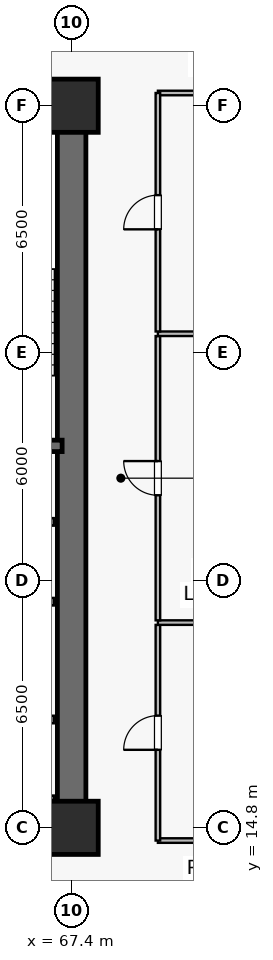
"""IFC4 building model, lengths in metres.
Left out: names, types, materials, properties, quantities, classifications, styles, units other than length and angle.
Written with IfcOpenShell. Run it as: python <this file> out.ifc"""

import sys

from ifc_helpers import new_model, si_unit, direction, frame, frame_2d, origin, origin_2d, place, context, subcontext, project, spatial, rectangle, extrude, source, transform, mapped, element, fill, save


model = new_model("IFC4")
c1 = context("Model", 3, precision=1e-05, world=origin(), true_north=direction((0.0, 1.0)))
c2 = subcontext(c1, "Body", "Model", "MODEL_VIEW")
j1 = project(units=[si_unit("LENGTHUNIT", "METRE"), si_unit("PLANEANGLEUNIT", "RADIAN")], contexts=[c1])
p1 = place(None, origin())
s1 = spatial("IfcSite", under=j1, at=p1, CompositionType="ELEMENT")
p2 = place(p1, origin())
s2 = spatial("IfcBuilding", under=s1, at=p2, CompositionType="ELEMENT")
p3 = place(p2, frame((0.0, 0.0, 82.6)))
s3 = spatial("IfcBuildingStorey", under=s2, at=p3, CompositionType="ELEMENT", Elevation=82.6)
p4 = place(p3, frame((52.225, 14.8, 0.0), z_axis=(0.0, 0.0, 1.0), x_axis=(1.0, 0.0, 0.0)))
e1 = element("IfcWall", 1, at=p4, inside=s3, PredefinedType="SHEAR", context=c2, shape_type="SweptSolid", body=[
    extrude(rectangle(XDim=15.55, YDim=0.75, at=frame_2d((7.775, 0.0))), origin(), (0.0, 0.0, 1.0), 3.78),
])
p5 = place(p3, frame((52.225, 33.8, 0.0), z_axis=(0.0, 0.0, 1.0), x_axis=(1.0, 0.0, 0.0)))
e2 = element("IfcWall", 2, at=p5, inside=s3, PredefinedType="SHEAR", context=c2, shape_type="SweptSolid", body=[
    extrude(rectangle(XDim=15.55, YDim=0.75, at=frame_2d((7.775, 0.0))), origin(), (0.0, 0.0, 1.0), 3.78),
])
p6 = place(p5, frame((9.3, 0.0, 0.0)))
e3 = element("IfcOpeningElement", 3, at=p6, cuts=e2, PredefinedType="OPENING", context=c2, shape_type="SweptSolid", body=[
    extrude(rectangle(XDim=0.95, YDim=2.15, at=frame_2d((0.475, 1.075))), frame((0.0, 0.385, 0.0), z_axis=(0.0, -1.0, 0.0), x_axis=(1.0, 0.0, 0.0)), (0.0, 0.0, 1.0), 0.77),
])
p7 = place(p5, frame((6.785, 0.0, 0.0)))
e4 = element("IfcOpeningElement", 4, at=p7, cuts=e2, PredefinedType="OPENING", context=c2, shape_type="SweptSolid", body=[
    extrude(rectangle(XDim=0.95, YDim=2.15, at=frame_2d((0.475, 1.075))), frame((0.0, 0.385, 0.0), z_axis=(0.0, -1.0, 0.0), x_axis=(1.0, 0.0, 0.0)), (0.0, 0.0, 1.0), 0.77),
])
p8 = place(p5, frame((4.235, 0.0, 0.0)))
e5 = element("IfcOpeningElement", 5, at=p8, cuts=e2, PredefinedType="OPENING", context=c2, shape_type="SweptSolid", body=[
    extrude(rectangle(XDim=0.95, YDim=2.15, at=frame_2d((0.475, 1.075))), frame((0.0, 0.385, 0.0), z_axis=(0.0, -1.0, 0.0), x_axis=(1.0, 0.0, 0.0)), (0.0, 0.0, 1.0), 0.77),
])
p9 = place(p5, frame((1.685, 0.0, 0.0)))
e6 = element("IfcOpeningElement", 6, at=p9, cuts=e2, PredefinedType="OPENING", context=c2, shape_type="SweptSolid", body=[
    extrude(rectangle(XDim=0.95, YDim=2.15, at=frame_2d((0.475, 1.075))), frame((0.0, 0.385, 0.0), z_axis=(0.0, -1.0, 0.0), x_axis=(1.0, 0.0, 0.0)), (0.0, 0.0, 1.0), 0.77),
])
p10 = place(p3, frame((67.4, 15.175, 0.0), z_axis=(0.0, 0.0, 1.0), x_axis=(0.0, 1.0, 0.0)))
e7 = element("IfcWall", 7, at=p10, inside=s3, PredefinedType="SHEAR", context=c2, shape_type="SweptSolid", body=[
    extrude(rectangle(XDim=18.25, YDim=0.75, at=frame_2d((9.125, 0.0))), origin(), (0.0, 0.0, 1.0), 3.78),
])
p11 = place(p3, frame((63.35, 24.85, 0.0), z_axis=(0.0, 0.0, 1.0), x_axis=(1.0, 0.0, 0.0)))
e8 = element("IfcWall", 8, at=p11, inside=s3, PredefinedType="SHEAR", context=c2, shape_type="SweptSolid", body=[
    extrude(rectangle(XDim=3.8, YDim=0.3, at=frame_2d((1.9, 0.0))), origin(), (0.0, 0.0, 1.0), 3.78),
])
p12 = place(p3, frame((63.35, 33.4, 0.0), z_axis=(0.0, 0.0, 1.0), x_axis=(1.0, 0.0, 0.0)))
e9 = element("IfcWall", 9, at=p12, inside=s3, PredefinedType="SOLIDWALL", context=c2, shape_type="SweptSolid", body=[
    extrude(rectangle(XDim=3.72, YDim=0.12, at=frame_2d((1.86, 0.0))), origin(), (0.0, 0.0, 1.0), 3.78),
])
m1 = source(origin(), c2, "Body", "SweptSolid", [
    extrude(rectangle(XDim=1.4, YDim=1.4, at=origin_2d()), origin(), (0.0, 0.0, 1.0), 4.1),
])
for number, where, z_axis, x_axis in (
    (10, (67.4, 14.8, 0.0), (0.0, 0.0, 1.0), (1.0, 0.0, 0.0)),
    (11, (67.4, 33.8, 0.0), (0.0, 0.0, 1.0), (1.0, 0.0, 0.0)),
):
    element("IfcColumn", number, at=place(p3, frame(where, z_axis=z_axis, x_axis=x_axis)), inside=s3, PredefinedType="COLUMN", context=c2, shape_type="MappedRepresentation", body=[
        mapped(m1, transform((0.0, 0.0, 0.0), scale=1.0)),
    ])
p13 = place(p3, frame((64.67, 17.65, 0.0), z_axis=(0.0, 0.0, 1.0), x_axis=(1.0, 0.0, 0.0)))
e12 = element("IfcWall", 12, at=p13, inside=s3, PredefinedType="SOLIDWALL", context=c2, shape_type="SweptSolid", body=[
    extrude(rectangle(XDim=2.26, YDim=0.2, at=frame_2d((1.13, 0.0))), origin(), (0.0, 0.0, 1.0), 3.78),
])
p14 = place(p13, frame((0.58, 0.0, 0.0)))
e13 = element("IfcOpeningElement", 13, at=p14, cuts=e12, PredefinedType="OPENING", context=c2, shape_type="SweptSolid", body=[
    extrude(rectangle(XDim=1.1, YDim=2.22, at=frame_2d((0.55, 1.11))), frame((0.0, 0.11, 0.0), z_axis=(0.0, -1.0, 0.0), x_axis=(1.0, 0.0, 0.0)), (0.0, 0.0, 1.0), 0.22),
])
for number, where, z_axis, x_axis in (
    (14, (64.67, 15.55, 0.0), (0.0, 0.0, 1.0), (1.0, 0.0, 0.0)),
    (15, (64.67, 20.75, 0.0), (0.0, 0.0, 1.0), (1.0, 0.0, 0.0)),
    (16, (64.67, 22.85, 0.0), (0.0, 0.0, 1.0), (1.0, 0.0, 0.0)),
):
    element("IfcWall", number, at=place(p3, frame(where, z_axis=z_axis, x_axis=x_axis)), inside=s3, PredefinedType="SOLIDWALL", context=c2, shape_type="SweptSolid", body=[
        extrude(rectangle(XDim=2.26, YDim=0.2, at=frame_2d((1.13, 0.0))), origin(), (0.0, 0.0, 1.0), 3.78),
    ])
for number, where, z_axis, x_axis in (
    (17, (69.67, 14.465, 0.0), (0.0, 0.0, 1.0), (1.0, 0.0, 0.0)),
    (18, (69.67, 34.135, 0.0), (0.0, 0.0, 1.0), (1.0, 0.0, 0.0)),
):
    element("IfcWall", number, at=place(p3, frame(where, z_axis=z_axis, x_axis=x_axis)), inside=s3, PredefinedType="PARTITIONING", context=c2, shape_type="SweptSolid", body=[
        extrude(rectangle(XDim=5.02, YDim=0.12, at=frame_2d((2.51, 0.0))), origin(), (0.0, 0.0, 1.0), 3.78),
    ])
p15 = place(p3, frame((69.67, 14.465, 0.0), z_axis=(0.0, 0.0, 1.0), x_axis=(0.0, 1.0, 0.0)))
e19 = element("IfcWall", 19, at=p15, inside=s3, PredefinedType="PARTITIONING", context=c2, shape_type="SweptSolid", body=[
    extrude(rectangle(XDim=5.675, YDim=0.12, at=frame_2d((2.837, 0.0))), origin(), (0.0, 0.0, 1.0), 3.78),
])
p16 = place(p15, frame((2.387, 0.0, 0.0)))
e20 = element("IfcOpeningElement", 20, at=p16, cuts=e19, PredefinedType="OPENING", context=c2, shape_type="SweptSolid", body=[
    extrude(rectangle(XDim=0.9, YDim=2.1, at=frame_2d((0.45, 1.05))), frame((0.0, 0.07, 0.0), z_axis=(0.0, -1.0, 0.0), x_axis=(1.0, 0.0, 0.0)), (0.0, 0.0, 1.0), 0.14),
])
p17 = place(p3, frame((69.67, 20.2, 0.0), z_axis=(0.0, 0.0, 1.0), x_axis=(1.0, 0.0, 0.0)))
e21 = element("IfcWall", 21, at=p17, inside=s3, PredefinedType="PARTITIONING", context=c2, shape_type="SweptSolid", body=[
    extrude(rectangle(XDim=5.02, YDim=0.12, at=frame_2d((2.51, 0.0))), origin(), (0.0, 0.0, 1.0), 3.78),
])
p18 = place(p3, frame((69.67, 20.26, 0.0), z_axis=(0.0, 0.0, 1.0), x_axis=(0.0, 1.0, 0.0)))
e22 = element("IfcWall", 22, at=p18, inside=s3, PredefinedType="PARTITIONING", context=c2, shape_type="SweptSolid", body=[
    extrude(rectangle(XDim=7.48, YDim=0.12, at=frame_2d((3.74, 0.0))), origin(), (0.0, 0.0, 1.0), 3.78),
])
p19 = place(p18, frame((3.29, 0.0, 0.0)))
e23 = element("IfcOpeningElement", 23, at=p19, cuts=e22, PredefinedType="OPENING", context=c2, shape_type="SweptSolid", body=[
    extrude(rectangle(XDim=0.9, YDim=2.1, at=frame_2d((0.45, 1.05))), frame((0.0, 0.07, 0.0), z_axis=(0.0, -1.0, 0.0), x_axis=(1.0, 0.0, 0.0)), (0.0, 0.0, 1.0), 0.14),
])
p20 = place(p3, frame((69.67, 27.8, 0.0), z_axis=(0.0, 0.0, 1.0), x_axis=(1.0, 0.0, 0.0)))
e24 = element("IfcWall", 24, at=p20, inside=s3, PredefinedType="PARTITIONING", context=c2, shape_type="SweptSolid", body=[
    extrude(rectangle(XDim=5.02, YDim=0.12, at=frame_2d((2.51, 0.0))), origin(), (0.0, 0.0, 1.0), 3.78),
])
p21 = place(p3, frame((69.67, 27.86, 0.0), z_axis=(0.0, 0.0, 1.0), x_axis=(0.0, 1.0, 0.0)))
e25 = element("IfcWall", 25, at=p21, inside=s3, PredefinedType="PARTITIONING", context=c2, shape_type="SweptSolid", body=[
    extrude(rectangle(XDim=6.275, YDim=0.12, at=frame_2d((3.137, 0.0))), origin(), (0.0, 0.0, 1.0), 3.78),
])
p22 = place(p21, frame((2.688, 0.0, 0.0)))
e26 = element("IfcOpeningElement", 26, at=p22, cuts=e25, PredefinedType="OPENING", context=c2, shape_type="SweptSolid", body=[
    extrude(rectangle(XDim=0.9, YDim=2.1, at=frame_2d((0.45, 1.05))), frame((0.0, 0.07, 0.0), z_axis=(0.0, -1.0, 0.0), x_axis=(1.0, 0.0, 0.0)), (0.0, 0.0, 1.0), 0.14),
])
m2 = source(origin(), c2, "Body", "SweptSolid", [
    extrude(rectangle(XDim=0.9, YDim=2.1, at=frame_2d((0.45, 1.05))), frame((0.0, 0.025, 0.0), z_axis=(0.0, -1.0, 0.0), x_axis=(1.0, 0.0, 0.0)), (0.0, 0.0, 1.0), 0.05),
])
p23 = place(p16, origin())
e27 = element("IfcDoor", 27, at=p23, inside=s3, OperationType="SINGLE_SWING_LEFT", PredefinedType="DOOR", context=c2, shape_type="MappedRepresentation", body=[
    mapped(m2, transform((0.0, 0.0, 0.0), scale=1.0)),
])
fill(e20, e27)
p24 = place(p19, origin())
e28 = element("IfcDoor", 28, at=p24, inside=s3, OperationType="SINGLE_SWING_RIGHT", PredefinedType="DOOR", context=c2, shape_type="MappedRepresentation", body=[
    mapped(m2, transform((0.0, 0.0, 0.0), scale=1.0)),
])
fill(e23, e28)
p25 = place(p22, origin())
e29 = element("IfcDoor", 29, at=p25, inside=s3, OperationType="SINGLE_SWING_LEFT", PredefinedType="DOOR", context=c2, shape_type="MappedRepresentation", body=[
    mapped(m2, transform((0.0, 0.0, 0.0), scale=1.0)),
])
fill(e26, e29)
save(model, sys.argv[1])
